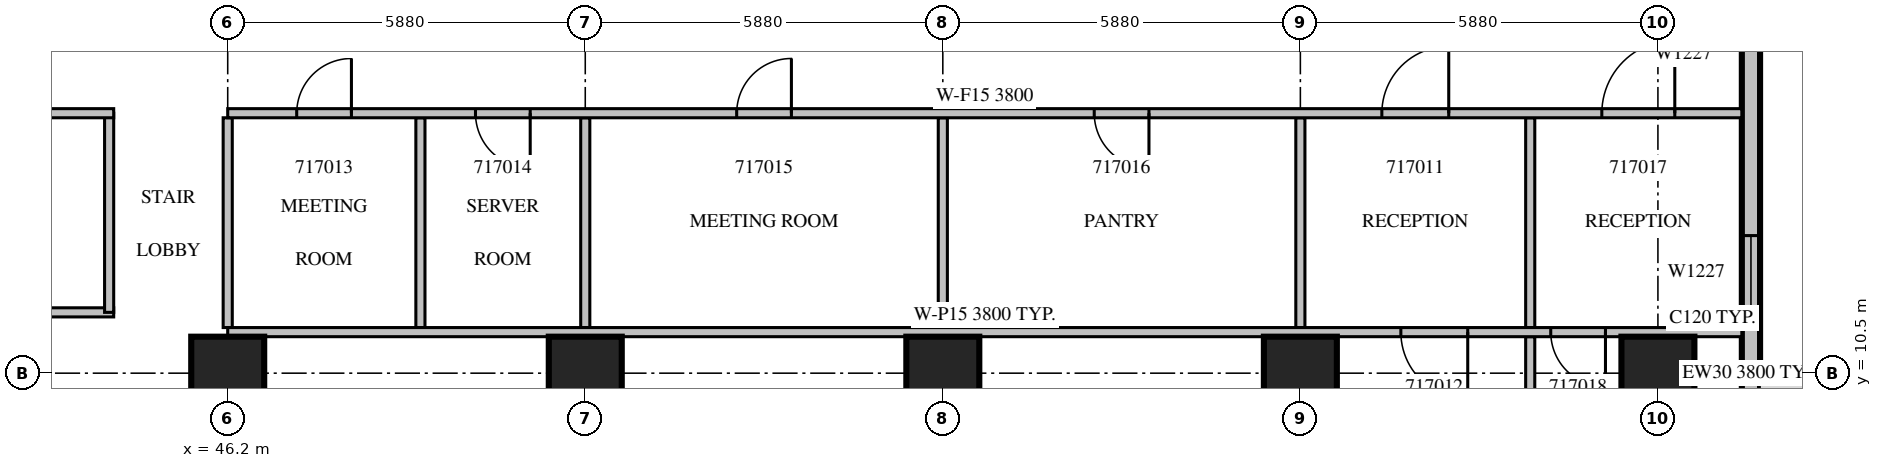
"""IFC4 building model, lengths in metres.
Left out: names, types, materials, properties, quantities, classifications, styles, units other than length and angle.
Written with IfcOpenShell. Run it as: python <this file> out.ifc"""

import sys

from ifc_helpers import new_model, si_unit, direction, frame, frame_2d, origin, origin_2d, place, context, subcontext, project, spatial, rectangle, extrude, source, transform, mapped, element, fill, save


model = new_model("IFC4")
c1 = context("Model", 3, precision=1e-05, world=origin(), true_north=direction((0.0, 1.0)))
c2 = subcontext(c1, "Body", "Model", "MODEL_VIEW")
j1 = project(units=[si_unit("LENGTHUNIT", "METRE"), si_unit("PLANEANGLEUNIT", "RADIAN")], contexts=[c1])
p1 = place(None, origin())
s1 = spatial("IfcSite", under=j1, at=p1, CompositionType="ELEMENT")
p2 = place(p1, origin())
s2 = spatial("IfcBuilding", under=s1, at=p2, CompositionType="ELEMENT")
p3 = place(p2, frame((0.0, 0.0, 82.5)))
s3 = spatial("IfcBuildingStorey", under=s2, at=p3, CompositionType="ELEMENT", Elevation=82.5)
m1 = source(origin(), c2, "Body", "SweptSolid", [
    extrude(rectangle(XDim=1.2, YDim=1.2, at=origin_2d()), origin(), (0.0, 0.0, 1.0), 4.2),
])
for number, where, z_axis, x_axis in (
    (1, (46.2, 10.5, 0.0), (0.0, 0.0, 1.0), (1.0, 0.0, 0.0)),
    (2, (52.08, 10.5, 0.0), (0.0, 0.0, 1.0), (1.0, 0.0, 0.0)),
    (3, (57.96, 10.5, 0.0), (0.0, 0.0, 1.0), (1.0, 0.0, 0.0)),
    (4, (63.84, 10.5, 0.0), (0.0, 0.0, 1.0), (1.0, 0.0, 0.0)),
    (5, (69.72, 10.5, 0.0), (0.0, 0.0, 1.0), (1.0, 0.0, 0.0)),
):
    element("IfcColumn", number, at=place(p3, frame(where, z_axis=z_axis, x_axis=x_axis)), inside=s3, PredefinedType="COLUMN", context=c2, shape_type="MappedRepresentation", body=[
        mapped(m1, transform((0.0, 0.0, 0.0), scale=1.0)),
    ])
m2 = source(origin(), c2, "Body", "SweptSolid", [
    extrude(rectangle(XDim=3.15, YDim=0.3, at=frame_2d((1.575, 0.0))), origin(), (0.0, 0.0, 1.0), 3.8),
])
p4 = place(p3, frame((71.25, 7.35, 0.0), z_axis=(0.0, 0.0, 1.0), x_axis=(0.0, 1.0, 0.0)))
e6 = element("IfcWall", 6, at=p4, inside=s3, PredefinedType="STANDARD", context=c2, shape_type="MappedRepresentation", body=[
    mapped(m2, transform((0.0, 0.0, 0.0), scale=1.0)),
])
m3 = source(origin(), c2, "Body", "SweptSolid", [
    extrude(rectangle(XDim=1.8, YDim=2.4, at=frame_2d((0.9, 1.2))), frame((0.0, 0.16, 0.0), z_axis=(0.0, -1.0, 0.0), x_axis=(1.0, 0.0, 0.0)), (0.0, 0.0, 1.0), 0.32),
])
p5 = place(p4, frame((0.675, 0.0, 0.0)))
e7 = element("IfcOpeningElement", 7, at=p5, cuts=e6, PredefinedType="OPENING", context=c2, shape_type="MappedRepresentation", body=[
    mapped(m3, transform((0.0, 0.0, 0.0), scale=1.0)),
])
m4 = source(origin(), c2, "Body", "SweptSolid", [
    extrude(rectangle(XDim=6.3, YDim=0.3, at=frame_2d((3.15, 0.0))), origin(), (0.0, 0.0, 1.0), 3.8),
])
p6 = place(p3, frame((71.25, 10.5, 0.0), z_axis=(0.0, 0.0, 1.0), x_axis=(0.0, 1.0, 0.0)))
e8 = element("IfcWall", 8, at=p6, inside=s3, PredefinedType="STANDARD", context=c2, shape_type="MappedRepresentation", body=[
    mapped(m4, transform((0.0, 0.0, 0.0), scale=1.0)),
])
m5 = source(origin(), c2, "Body", "SweptSolid", [
    extrude(rectangle(XDim=1.2, YDim=2.7, at=frame_2d((0.6, 1.35))), frame((0.0, 0.16, 0.0), z_axis=(0.0, -1.0, 0.0), x_axis=(1.0, 0.0, 0.0)), (0.0, 0.0, 1.0), 0.32),
])
p7 = place(p6, frame((1.062, 0.0, 0.6)))
e9 = element("IfcOpeningElement", 9, at=p7, cuts=e8, PredefinedType="OPENING", context=c2, shape_type="MappedRepresentation", body=[
    mapped(m5, transform((0.0, 0.0, 0.0), scale=1.0)),
])
m6 = source(origin(), c2, "Body", "SweptSolid", [
    extrude(rectangle(XDim=6.45, YDim=0.15, at=frame_2d((3.225, 0.0))), origin(), (0.0, 0.0, 1.0), 3.8),
])
p8 = place(p3, frame((37.875, 11.5, 0.0), z_axis=(0.0, 0.0, 1.0), x_axis=(1.0, 0.0, 0.0)))
e10 = element("IfcWall", 10, at=p8, inside=s3, PredefinedType="PARTITIONING", context=c2, shape_type="MappedRepresentation", body=[
    mapped(m6, transform((0.0, 0.0, 0.0), scale=1.0)),
])
p9 = place(p3, frame((44.25, 11.5, 0.0), z_axis=(0.0, 0.0, 1.0), x_axis=(0.0, 1.0, 0.0)))
e11 = element("IfcWall", 11, at=p9, inside=s3, PredefinedType="PARTITIONING", context=c2, shape_type="SweptSolid", body=[
    extrude(rectangle(XDim=3.275, YDim=0.15, at=frame_2d((1.637, 0.0))), origin(), (0.0, 0.0, 1.0), 3.8),
])
p10 = place(p3, frame((44.325, 14.775, 0.0), z_axis=(0.0, 0.0, 1.0), x_axis=(-1.0, 0.0, 0.0)))
e12 = element("IfcWall", 12, at=p10, inside=s3, PredefinedType="PARTITIONING", context=c2, shape_type="MappedRepresentation", body=[
    mapped(m6, transform((0.0, 0.0, 0.0), scale=1.0)),
])
m7 = source(origin(), c2, "Body", "SweptSolid", [
    extrude(rectangle(XDim=0.9, YDim=2.1, at=frame_2d((0.45, 1.05))), frame((0.0, 0.085, 0.0), z_axis=(0.0, -1.0, 0.0), x_axis=(1.0, 0.0, 0.0)), (0.0, 0.0, 1.0), 0.17),
])
p11 = place(p10, frame((2.812, 0.0, 0.0)))
e13 = element("IfcOpeningElement", 13, at=p11, cuts=e12, PredefinedType="OPENING", context=c2, shape_type="MappedRepresentation", body=[
    mapped(m7, transform((0.0, 0.0, 0.0), scale=1.0)),
])
m8 = source(origin(), c2, "Body", "SweptSolid", [
    extrude(rectangle(XDim=3.45, YDim=0.15, at=frame_2d((1.725, 0.0))), origin(), (0.0, 0.0, 1.0), 3.8),
])
for number, where, z_axis, x_axis in (
    (14, (49.369, 11.25, 0.0), (0.0, 0.0, 1.0), (0.0, 1.0, 0.0)),
    (15, (52.08, 11.25, 0.0), (0.0, 0.0, 1.0), (0.0, 1.0, 0.0)),
    (16, (57.96, 11.25, 0.0), (0.0, 0.0, 1.0), (0.0, 1.0, 0.0)),
    (17, (63.84, 11.25, 0.0), (0.0, 0.0, 1.0), (0.0, 1.0, 0.0)),
    (18, (46.2, 11.25, 0.0), (0.0, 0.0, 1.0), (0.0, 1.0, 0.0)),
):
    element("IfcWall", number, at=place(p3, frame(where, z_axis=z_axis, x_axis=x_axis)), inside=s3, PredefinedType="PARTITIONING", context=c2, shape_type="MappedRepresentation", body=[
        mapped(m8, transform((0.0, 0.0, 0.0), scale=1.0)),
    ])
m9 = source(origin(), c2, "Body", "SweptSolid", [
    extrude(rectangle(XDim=6.695, YDim=0.15, at=frame_2d((3.348, 0.0))), origin(), (0.0, 0.0, 1.0), 3.8),
])
p12 = place(p3, frame((67.62, 4.405, 0.0), z_axis=(0.0, 0.0, 1.0), x_axis=(0.0, 1.0, 0.0)))
e19 = element("IfcWall", 19, at=p12, inside=s3, PredefinedType="PARTITIONING", context=c2, shape_type="MappedRepresentation", body=[
    mapped(m9, transform((0.0, 0.0, 0.0), scale=1.0)),
])
p13 = place(p3, frame((67.62, 11.25, 0.0), z_axis=(0.0, 0.0, 1.0), x_axis=(0.0, 1.0, 0.0)))
e20 = element("IfcWall", 20, at=p13, inside=s3, PredefinedType="PARTITIONING", context=c2, shape_type="MappedRepresentation", body=[
    mapped(m8, transform((0.0, 0.0, 0.0), scale=1.0)),
])
m10 = source(origin(), c2, "Body", "SweptSolid", [
    extrude(rectangle(XDim=24.9, YDim=0.15, at=frame_2d((12.45, 0.0))), origin(), (0.0, 0.0, 1.0), 3.8),
])
p14 = place(p3, frame((71.1, 11.175, 0.0), z_axis=(0.0, 0.0, 1.0), x_axis=(-1.0, 0.0, 0.0)))
e21 = element("IfcWall", 21, at=p14, inside=s3, PredefinedType="PARTITIONING", context=c2, shape_type="MappedRepresentation", body=[
    mapped(m10, transform((0.0, 0.0, 0.0), scale=1.0)),
])
m11 = source(origin(), c2, "Body", "SweptSolid", [
    extrude(rectangle(XDim=1.1, YDim=2.1, at=frame_2d((0.55, 1.05))), frame((0.0, 0.085, 0.0), z_axis=(0.0, -1.0, 0.0), x_axis=(1.0, 0.0, 0.0)), (0.0, 0.0, 1.0), 0.17),
])
p15 = place(p14, frame((4.508, 0.0, 0.0)))
e22 = element("IfcOpeningElement", 22, at=p15, cuts=e21, PredefinedType="OPENING", context=c2, shape_type="MappedRepresentation", body=[
    mapped(m11, transform((0.0, 0.0, 0.0), scale=1.0)),
])
p16 = place(p14, frame((2.243, 0.0, 0.0)))
e23 = element("IfcOpeningElement", 23, at=p16, cuts=e21, PredefinedType="OPENING", context=c2, shape_type="MappedRepresentation", body=[
    mapped(m7, transform((0.0, 0.0, 0.0), scale=1.0)),
])
p17 = place(p3, frame((71.1, 14.775, 0.0), z_axis=(0.0, 0.0, 1.0), x_axis=(-1.0, 0.0, 0.0)))
e24 = element("IfcWall", 24, at=p17, inside=s3, PredefinedType="PARTITIONING", context=c2, shape_type="MappedRepresentation", body=[
    mapped(m10, transform((0.0, 0.0, 0.0), scale=1.0)),
])
p18 = place(p17, frame((4.82, 0.0, 0.0)))
e25 = element("IfcOpeningElement", 25, at=p18, cuts=e24, PredefinedType="OPENING", context=c2, shape_type="MappedRepresentation", body=[
    mapped(m11, transform((0.0, 0.0, 0.0), scale=1.0)),
])
p19 = place(p17, frame((22.866, 0.0, 0.0)))
e26 = element("IfcOpeningElement", 26, at=p19, cuts=e24, PredefinedType="OPENING", context=c2, shape_type="MappedRepresentation", body=[
    mapped(m7, transform((0.0, 0.0, 0.0), scale=1.0)),
])
p20 = place(p17, frame((19.925, 0.0, 0.0)))
e27 = element("IfcOpeningElement", 27, at=p20, cuts=e24, PredefinedType="OPENING", context=c2, shape_type="MappedRepresentation", body=[
    mapped(m7, transform((0.0, 0.0, 0.0), scale=1.0)),
])
p21 = place(p17, frame((15.63, 0.0, 0.0)))
e28 = element("IfcOpeningElement", 28, at=p21, cuts=e24, PredefinedType="OPENING", context=c2, shape_type="MappedRepresentation", body=[
    mapped(m7, transform((0.0, 0.0, 0.0), scale=1.0)),
])
p22 = place(p17, frame((9.75, 0.0, 0.0)))
e29 = element("IfcOpeningElement", 29, at=p22, cuts=e24, PredefinedType="OPENING", context=c2, shape_type="MappedRepresentation", body=[
    mapped(m7, transform((0.0, 0.0, 0.0), scale=1.0)),
])
m12 = source(origin(), c2, "Body", "SweptSolid", [
    extrude(rectangle(XDim=1.2, YDim=2.1, at=frame_2d((0.6, 1.05))), frame((0.0, 0.085, 0.0), z_axis=(0.0, -1.0, 0.0), x_axis=(1.0, 0.0, 0.0)), (0.0, 0.0, 1.0), 0.17),
])
p23 = place(p17, frame((1.103, 0.0, 0.0)))
e30 = element("IfcOpeningElement", 30, at=p23, cuts=e24, PredefinedType="OPENING", context=c2, shape_type="MappedRepresentation", body=[
    mapped(m12, transform((0.0, 0.0, 0.0), scale=1.0)),
])
m13 = source(origin(), c2, "Body", "SweptSolid", [
    extrude(rectangle(XDim=1.2, YDim=2.7, at=frame_2d((0.6, 1.35))), frame((0.0, 0.03, 0.0), z_axis=(0.0, -1.0, 0.0), x_axis=(1.0, 0.0, 0.0)), (0.0, 0.0, 1.0), 0.06),
])
p24 = place(p7, origin())
e31 = element("IfcWindow", 31, at=p24, inside=s3, PartitioningType="SINGLE_PANEL", PredefinedType="WINDOW", context=c2, shape_type="MappedRepresentation", body=[
    mapped(m13, transform((0.0, 0.0, 0.0), scale=1.0)),
])
fill(e9, e31)
m14 = source(origin(), c2, "Body", "SweptSolid", [
    extrude(rectangle(XDim=1.1, YDim=2.1, at=frame_2d((0.55, 1.05))), frame((0.0, 0.025, 0.0), z_axis=(0.0, -1.0, 0.0), x_axis=(1.0, 0.0, 0.0)), (0.0, 0.0, 1.0), 0.05),
])
p25 = place(p18, origin())
e32 = element("IfcDoor", 32, at=p25, inside=s3, OperationType="SINGLE_SWING_RIGHT", PredefinedType="DOOR", context=c2, shape_type="MappedRepresentation", body=[
    mapped(m14, transform((0.0, 0.0, 0.0), scale=1.0)),
])
fill(e25, e32)
p26 = place(p15, origin())
e33 = element("IfcDoor", 33, at=p26, inside=s3, OperationType="SINGLE_SWING_LEFT", PredefinedType="DOOR", context=c2, shape_type="MappedRepresentation", body=[
    mapped(m14, transform((0.0, 0.0, 0.0), scale=1.0)),
])
fill(e22, e33)
m15 = source(origin(), c2, "Body", "SweptSolid", [
    extrude(rectangle(XDim=0.9, YDim=2.1, at=frame_2d((0.45, 1.05))), frame((0.0, 0.025, 0.0), z_axis=(0.0, -1.0, 0.0), x_axis=(1.0, 0.0, 0.0)), (0.0, 0.0, 1.0), 0.05),
])
p27 = place(p19, origin())
e34 = element("IfcDoor", 34, at=p27, inside=s3, OperationType="SINGLE_SWING_RIGHT", PredefinedType="DOOR", context=c2, shape_type="MappedRepresentation", body=[
    mapped(m15, transform((0.0, 0.0, 0.0), scale=1.0)),
])
fill(e26, e34)
p28 = place(p20, origin())
e35 = element("IfcDoor", 35, at=p28, inside=s3, OperationType="SINGLE_SWING_LEFT", PredefinedType="DOOR", context=c2, shape_type="MappedRepresentation", body=[
    mapped(m15, transform((0.0, 0.0, 0.0), scale=1.0)),
])
fill(e27, e35)
p29 = place(p21, origin())
e36 = element("IfcDoor", 36, at=p29, inside=s3, OperationType="SINGLE_SWING_RIGHT", PredefinedType="DOOR", context=c2, shape_type="MappedRepresentation", body=[
    mapped(m15, transform((0.0, 0.0, 0.0), scale=1.0)),
])
fill(e28, e36)
p30 = place(p22, origin())
e37 = element("IfcDoor", 37, at=p30, inside=s3, OperationType="SINGLE_SWING_LEFT", PredefinedType="DOOR", context=c2, shape_type="MappedRepresentation", body=[
    mapped(m15, transform((0.0, 0.0, 0.0), scale=1.0)),
])
fill(e29, e37)
m16 = source(origin(), c2, "Body", "SweptSolid", [
    extrude(rectangle(XDim=1.2, YDim=2.1, at=frame_2d((0.6, 1.05))), frame((0.0, 0.025, 0.0), z_axis=(0.0, -1.0, 0.0), x_axis=(1.0, 0.0, 0.0)), (0.0, 0.0, 1.0), 0.05),
])
p31 = place(p23, origin())
e38 = element("IfcDoor", 38, at=p31, inside=s3, OperationType="SINGLE_SWING_RIGHT", PredefinedType="DOOR", context=c2, shape_type="MappedRepresentation", body=[
    mapped(m16, transform((0.0, 0.0, 0.0), scale=1.0)),
])
fill(e30, e38)
p32 = place(p16, origin())
e39 = element("IfcDoor", 39, at=p32, inside=s3, OperationType="SINGLE_SWING_LEFT", PredefinedType="DOOR", context=c2, shape_type="MappedRepresentation", body=[
    mapped(m15, transform((0.0, 0.0, 0.0), scale=1.0)),
])
fill(e23, e39)
save(model, sys.argv[1])
